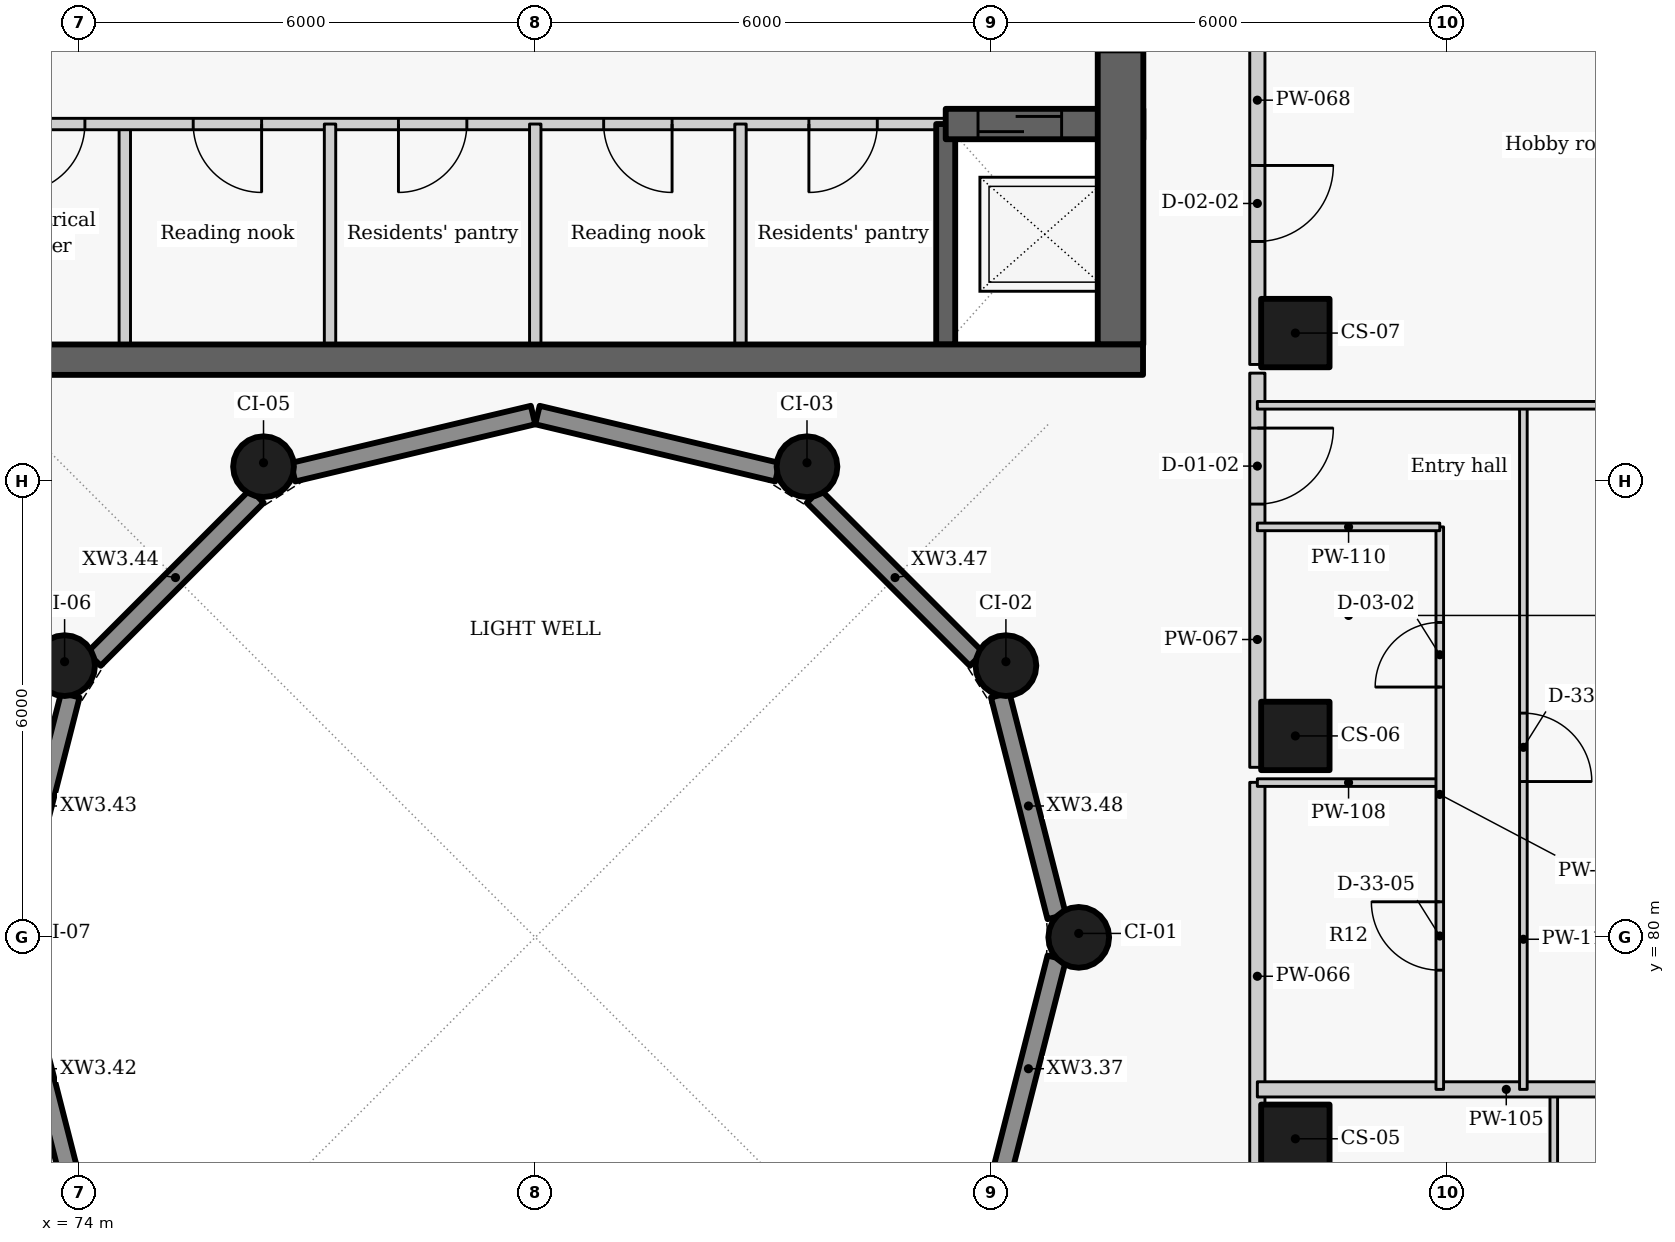
"""IFC4 building model, lengths in metres.
Left out: names, types, materials, properties, quantities, classifications, styles, units other than length and angle.
Written with IfcOpenShell. Run it as: python <this file> out.ifc"""

import sys

from ifc_helpers import new_model, si_unit, direction, frame, frame_2d, origin, origin_2d, place, context, subcontext, project, spatial, rectangle, circle, extrude, element, fill, save


model = new_model("IFC4")
c1 = context("Model", 3, precision=1e-05, world=origin(), true_north=direction((0.0, 1.0)))
c2 = subcontext(c1, "Body", "Model", "MODEL_VIEW")
j1 = project(units=[si_unit("LENGTHUNIT", "METRE"), si_unit("PLANEANGLEUNIT", "RADIAN")], contexts=[c1])
p1 = place(None, origin())
s1 = spatial("IfcSite", under=j1, at=p1, CompositionType="ELEMENT")
p2 = place(p1, origin())
s2 = spatial("IfcBuilding", under=s1, at=p2, CompositionType="ELEMENT")
p3 = place(p2, frame((0.0, 0.0, 239.4)))
s3 = spatial("IfcBuildingStorey", under=s2, at=p3, CompositionType="ELEMENT", Elevation=239.4)
for number, where, z_axis, x_axis in (
    (1, (90.0, 77.35, 0.0), (0.0, 0.0, 1.0), (0.0, 1.0, 0.0)),
    (2, (90.0, 82.65, 0.0), (0.0, 0.0, 1.0), (0.0, 1.0, 0.0)),
    (3, (90.0, 87.95, 0.0), (0.0, 0.0, 1.0), (0.0, 1.0, 0.0)),
):
    element("IfcColumn", number, at=place(p3, frame(where, z_axis=z_axis, x_axis=x_axis)), inside=s3, PredefinedType="COLUMN", context=c2, shape_type="SweptSolid", body=[
        extrude(rectangle(XDim=0.9, YDim=0.9, at=origin_2d()), origin(), (0.0, 0.0, 1.0), 3.3),
    ])
for number, where, z_axis, x_axis in (
    (4, (87.15, 80.0, 0.0), (0.0, 0.0, 1.0), (0.0, 1.0, 0.0)),
    (5, (86.192, 83.575, 0.0), (0.0, 0.0, 1.0), (-0.5, 0.866, 0.0)),
    (6, (83.575, 86.192, 0.0), (0.0, 0.0, 1.0), (-0.866, 0.5, 0.0)),
    (7, (76.425, 86.192, 0.0), (0.0, 0.0, 1.0), (-0.866, -0.5, 0.0)),
    (8, (73.808, 83.575, 0.0), (0.0, 0.0, 1.0), (-0.5, -0.866, 0.0)),
):
    element("IfcColumn", number, at=place(p3, frame(where, z_axis=z_axis, x_axis=x_axis)), inside=s3, PredefinedType="COLUMN", context=c2, shape_type="SweptSolid", body=[
        extrude(circle(Radius=0.4, at=origin_2d()), origin(), (0.0, 0.0, 1.0), 3.3),
    ])
for number, where, z_axis, x_axis in (
    (9, (86.86, 79.73, 0.0), (0.0, 0.0, 1.0), (-0.247, -0.969, 0.0)),
    (10, (73.883, 76.813, 0.0), (0.0, 0.0, 1.0), (-0.247, 0.969, 0.0)),
    (11, (73.14, 80.27, 0.0), (0.0, 0.0, 1.0), (0.247, 0.969, 0.0)),
):
    element("IfcWall", number, at=place(p3, frame(where, z_axis=z_axis, x_axis=x_axis)), inside=s3, PredefinedType="SOLIDWALL", context=c2, shape_type="SweptSolid", body=[
        extrude(rectangle(XDim=3.01, YDim=0.25, at=frame_2d((1.505, 0.0))), origin(), (0.0, 0.0, 1.0), 2.425),
    ])
p4 = place(p3, frame((74.194, 83.661, 0.0), z_axis=(0.0, 0.0, 1.0), x_axis=(0.707106781187, 0.707106781187, 0.0)))
e12 = element("IfcWall", 12, at=p4, inside=s3, PredefinedType="SOLIDWALL", context=c2, shape_type="SweptSolid", body=[
    extrude(rectangle(XDim=3.033, YDim=0.25, at=frame_2d((1.517, 0.0))), origin(), (0.0, 0.0, 1.0), 2.425),
])
for number, where, z_axis, x_axis in (
    (13, (76.814, 86.119, 0.0), (0.0, 0.0, 1.0), (0.973, 0.232, 0.0)),
    (14, (80.029, 86.872, 0.0), (0.0, 0.0, 1.0), (0.973, -0.232, 0.0)),
):
    element("IfcWall", number, at=place(p3, frame(where, z_axis=z_axis, x_axis=x_axis)), inside=s3, PredefinedType="SOLIDWALL", context=c2, shape_type="SweptSolid", body=[
        extrude(rectangle(XDim=3.246, YDim=0.25, at=frame_2d((1.623, 0.0))), origin(), (0.0, 0.0, 1.0), 2.425),
    ])
p5 = place(p3, frame((83.661, 85.806, 0.0), z_axis=(0.0, 0.0, 1.0), x_axis=(0.707106781187, -0.707106781187, 0.0)))
e15 = element("IfcWall", 15, at=p5, inside=s3, PredefinedType="SOLIDWALL", context=c2, shape_type="SweptSolid", body=[
    extrude(rectangle(XDim=3.033, YDim=0.25, at=frame_2d((1.517, 0.0))), origin(), (0.0, 0.0, 1.0), 2.425),
])
p6 = place(p3, frame((86.117, 83.187, 0.0), z_axis=(0.0, 0.0, 1.0), x_axis=(0.247055971283, -0.969001211069, 0.0)))
e16 = element("IfcWall", 16, at=p6, inside=s3, PredefinedType="SOLIDWALL", context=c2, shape_type="SweptSolid", body=[
    extrude(rectangle(XDim=3.01, YDim=0.25, at=frame_2d((1.505, 0.0))), origin(), (0.0, 0.0, 1.0), 2.425),
])
p7 = place(p3, frame((74.6, 87.8, 0.0), z_axis=(0.0, 0.0, 1.0), x_axis=(0.0, 1.0, 0.0)))
e17 = element("IfcWall", 17, at=p7, inside=s3, PredefinedType="PARTITIONING", context=c2, shape_type="SweptSolid", body=[
    extrude(rectangle(XDim=2.9, YDim=0.15, at=frame_2d((1.45, 0.0))), origin(), (0.0, 0.0, 1.0), 3.025),
])
p8 = place(p3, frame((85.4, 90.7, 0.0), z_axis=(0.0, 0.0, 1.0), x_axis=(-1.0, 0.0, 0.0)))
e18 = element("IfcWall", 18, at=p8, inside=s3, PredefinedType="PARTITIONING", context=c2, shape_type="SweptSolid", body=[
    extrude(rectangle(XDim=13.4, YDim=0.15, at=frame_2d((6.7, 0.0))), origin(), (0.0, 0.0, 1.0), 3.025),
])
p9 = place(p8, frame((11.325, 0.0, 0.0)))
e19 = element("IfcOpeningElement", 19, at=p9, cuts=e18, PredefinedType="OPENING", context=c2, shape_type="SweptSolid", body=[
    extrude(rectangle(XDim=0.9, YDim=2.1, at=frame_2d((0.45, 1.05))), frame((0.0, 0.085, 0.0), z_axis=(0.0, -1.0, 0.0), x_axis=(1.0, 0.0, 0.0)), (0.0, 0.0, 1.0), 0.17),
])
p10 = place(p8, frame((9.0, 0.0, 0.0)))
e20 = element("IfcOpeningElement", 20, at=p10, cuts=e18, PredefinedType="OPENING", context=c2, shape_type="SweptSolid", body=[
    extrude(rectangle(XDim=0.9, YDim=2.1, at=frame_2d((0.45, 1.05))), frame((0.0, 0.085, 0.0), z_axis=(0.0, -1.0, 0.0), x_axis=(1.0, 0.0, 0.0)), (0.0, 0.0, 1.0), 0.17),
])
p11 = place(p8, frame((6.3, 0.0, 0.0)))
e21 = element("IfcOpeningElement", 21, at=p11, cuts=e18, PredefinedType="OPENING", context=c2, shape_type="SweptSolid", body=[
    extrude(rectangle(XDim=0.9, YDim=2.1, at=frame_2d((0.45, 1.05))), frame((0.0, 0.085, 0.0), z_axis=(0.0, -1.0, 0.0), x_axis=(1.0, 0.0, 0.0)), (0.0, 0.0, 1.0), 0.17),
])
p12 = place(p8, frame((3.6, 0.0, 0.0)))
e22 = element("IfcOpeningElement", 22, at=p12, cuts=e18, PredefinedType="OPENING", context=c2, shape_type="SweptSolid", body=[
    extrude(rectangle(XDim=0.9, YDim=2.1, at=frame_2d((0.45, 1.05))), frame((0.0, 0.085, 0.0), z_axis=(0.0, -1.0, 0.0), x_axis=(1.0, 0.0, 0.0)), (0.0, 0.0, 1.0), 0.17),
])
p13 = place(p8, frame((0.9, 0.0, 0.0)))
e23 = element("IfcOpeningElement", 23, at=p13, cuts=e18, PredefinedType="OPENING", context=c2, shape_type="SweptSolid", body=[
    extrude(rectangle(XDim=0.9, YDim=2.1, at=frame_2d((0.45, 1.05))), frame((0.0, 0.085, 0.0), z_axis=(0.0, -1.0, 0.0), x_axis=(1.0, 0.0, 0.0)), (0.0, 0.0, 1.0), 0.17),
])
p14 = place(p3, frame((85.4, 87.8, -0.275), z_axis=(0.0, 0.0, 1.0), x_axis=(0.0, 1.0, 0.0)))
e24 = element("IfcWall", 24, at=p14, inside=s3, PredefinedType="SHEAR", context=c2, shape_type="SweptSolid", body=[
    extrude(rectangle(XDim=2.9, YDim=0.25, at=frame_2d((1.45, 0.0))), origin(), (0.0, 0.0, 1.0), 3.3),
])
p15 = place(p3, frame((85.4, 90.7, -0.275), z_axis=(0.0, 0.0, 1.0), x_axis=(1.0, 0.0, 0.0)))
e25 = element("IfcWall", 25, at=p15, inside=s3, PredefinedType="SHEAR", context=c2, shape_type="SweptSolid", body=[
    extrude(rectangle(XDim=2.6, YDim=0.4, at=frame_2d((1.3, 0.0))), origin(), (0.0, 0.0, 1.0), 3.3),
])
p16 = place(p15, frame((0.425, 0.0, 0.275)))
e26 = element("IfcOpeningElement", 26, at=p16, cuts=e25, PredefinedType="OPENING", context=c2, shape_type="SweptSolid", body=[
    extrude(rectangle(XDim=1.1, YDim=2.1, at=frame_2d((0.55, 1.05))), frame((0.0, 0.21, 0.0), z_axis=(0.0, -1.0, 0.0), x_axis=(1.0, 0.0, 0.0)), (0.0, 0.0, 1.0), 0.42),
])
p17 = place(p3, frame((87.7, 102.05, -0.275), z_axis=(0.0, 0.0, 1.0), x_axis=(0.0, -1.0, 0.0)))
e27 = element("IfcWall", 27, at=p17, inside=s3, PredefinedType="SHEAR", context=c2, shape_type="SweptSolid", body=[
    extrude(rectangle(XDim=14.25, YDim=0.6, at=frame_2d((7.125, 0.0))), origin(), (0.0, 0.0, 1.0), 3.3),
])
p18 = place(p17, frame((8.9, 0.0, 0.275)))
e28 = element("IfcOpeningElement", 28, at=p18, cuts=e27, PredefinedType="OPENING", context=c2, shape_type="SweptSolid", body=[
    extrude(rectangle(XDim=1.5, YDim=2.1, at=frame_2d((0.75, 1.05))), frame((0.0, 0.31, 0.0), z_axis=(0.0, -1.0, 0.0), x_axis=(1.0, 0.0, 0.0)), (0.0, 0.0, 1.0), 0.62),
])
p19 = place(p17, frame((2.025, 0.0, 0.275)))
e29 = element("IfcOpeningElement", 29, at=p19, cuts=e27, PredefinedType="OPENING", context=c2, shape_type="SweptSolid", body=[
    extrude(rectangle(XDim=1.1, YDim=2.1, at=frame_2d((0.55, 1.05))), frame((0.0, 0.31, 0.0), z_axis=(0.0, -1.0, 0.0), x_axis=(1.0, 0.0, 0.0)), (0.0, 0.0, 1.0), 0.62),
])
for number, where, z_axis, x_axis in (
    (30, (77.3, 87.8, 0.0), (0.0, 0.0, 1.0), (0.0, 1.0, 0.0)),
    (31, (80.0, 87.8, 0.0), (0.0, 0.0, 1.0), (0.0, 1.0, 0.0)),
    (32, (82.7, 87.8, 0.0), (0.0, 0.0, 1.0), (0.0, 1.0, 0.0)),
):
    element("IfcWall", number, at=place(p3, frame(where, z_axis=z_axis, x_axis=x_axis)), inside=s3, PredefinedType="PARTITIONING", context=c2, shape_type="SweptSolid", body=[
        extrude(rectangle(XDim=2.9, YDim=0.15, at=frame_2d((1.45, 0.0))), origin(), (0.0, 0.0, 1.0), 3.025),
    ])
p20 = place(p3, frame((89.5, 76.937, 0.0), z_axis=(0.0, 0.0, 1.0), x_axis=(0.0, 1.0, 0.0)))
e33 = element("IfcWall", 33, at=p20, inside=s3, PredefinedType="PARTITIONING", context=c2, shape_type="SweptSolid", body=[
    extrude(rectangle(XDim=5.102, YDim=0.2, at=frame_2d((2.551, 0.0))), origin(), (0.0, 0.0, 1.0), 3.025),
])
p21 = place(p3, frame((89.5, 87.423, 0.0), z_axis=(0.0, 0.0, 1.0), x_axis=(0.0, -1.0, 0.0)))
e34 = element("IfcWall", 34, at=p21, inside=s3, PredefinedType="PARTITIONING", context=c2, shape_type="SweptSolid", body=[
    extrude(rectangle(XDim=5.186, YDim=0.2, at=frame_2d((2.593, 0.0))), origin(), (0.0, 0.0, 1.0), 3.025),
])
p22 = place(p21, frame((0.723, 0.0, 0.0)))
e35 = element("IfcOpeningElement", 35, at=p22, cuts=e34, PredefinedType="OPENING", context=c2, shape_type="SweptSolid", body=[
    extrude(rectangle(XDim=1.0, YDim=2.1, at=frame_2d((0.5, 1.05))), frame((0.0, 0.11, 0.0), z_axis=(0.0, -1.0, 0.0), x_axis=(1.0, 0.0, 0.0)), (0.0, 0.0, 1.0), 0.22),
])
p23 = place(p3, frame((89.5, 91.773, 0.0), z_axis=(0.0, 0.0, 1.0), x_axis=(0.0, -1.0, 0.0)))
e36 = element("IfcWall", 36, at=p23, inside=s3, PredefinedType="PARTITIONING", context=c2, shape_type="SweptSolid", body=[
    extrude(rectangle(XDim=4.236, YDim=0.2, at=frame_2d((2.118, 0.0))), origin(), (0.0, 0.0, 1.0), 3.025),
])
p24 = place(p23, frame((1.618, 0.0, 0.0)))
e37 = element("IfcOpeningElement", 37, at=p24, cuts=e36, PredefinedType="OPENING", context=c2, shape_type="SweptSolid", body=[
    extrude(rectangle(XDim=1.0, YDim=2.1, at=frame_2d((0.5, 1.05))), frame((0.0, 0.11, 0.0), z_axis=(0.0, -1.0, 0.0), x_axis=(1.0, 0.0, 0.0)), (0.0, 0.0, 1.0), 0.22),
])
p25 = place(p3, frame((93.4, 78.0, 0.0), z_axis=(0.0, 0.0, 1.0), x_axis=(0.0, -1.0, 0.0)))
e38 = element("IfcWall", 38, at=p25, inside=s3, PredefinedType="PARTITIONING", context=c2, shape_type="SweptSolid", body=[
    extrude(rectangle(XDim=11.2, YDim=0.1, at=frame_2d((5.6, 0.0))), origin(), (0.0, 0.0, 1.0), 3.025),
])
p26 = place(p25, frame((9.124, 0.0, 0.0)))
e39 = element("IfcOpeningElement", 39, at=p26, cuts=e38, PredefinedType="OPENING", context=c2, shape_type="SweptSolid", body=[
    extrude(rectangle(XDim=0.9, YDim=2.1, at=frame_2d((0.45, 1.05))), frame((0.0, 0.06, 0.0), z_axis=(0.0, -1.0, 0.0), x_axis=(1.0, 0.0, 0.0)), (0.0, 0.0, 1.0), 0.12),
])
p27 = place(p25, frame((5.873, 0.0, 0.0)))
e40 = element("IfcOpeningElement", 40, at=p27, cuts=e38, PredefinedType="OPENING", context=c2, shape_type="SweptSolid", body=[
    extrude(rectangle(XDim=0.9, YDim=2.1, at=frame_2d((0.45, 1.05))), frame((0.0, 0.06, 0.0), z_axis=(0.0, -1.0, 0.0), x_axis=(1.0, 0.0, 0.0)), (0.0, 0.0, 1.0), 0.12),
])
p28 = place(p25, frame((1.898, 0.0, 0.0)))
e41 = element("IfcOpeningElement", 41, at=p28, cuts=e38, PredefinedType="OPENING", context=c2, shape_type="SweptSolid", body=[
    extrude(rectangle(XDim=0.9, YDim=2.1, at=frame_2d((0.45, 1.05))), frame((0.0, 0.06, 0.0), z_axis=(0.0, -1.0, 0.0), x_axis=(1.0, 0.0, 0.0)), (0.0, 0.0, 1.0), 0.12),
])
p29 = place(p3, frame((89.5, 78.0, 0.0), z_axis=(0.0, 0.0, 1.0), x_axis=(1.0, 0.0, 0.0)))
e42 = element("IfcWall", 42, at=p29, inside=s3, PredefinedType="PARTITIONING", context=c2, shape_type="SweptSolid", body=[
    extrude(rectangle(XDim=6.55, YDim=0.2, at=frame_2d((3.275, 0.0))), origin(), (0.0, 0.0, 1.0), 2.405),
])
p30 = place(p3, frame((89.5, 82.036, 0.0), z_axis=(0.0, 0.0, 1.0), x_axis=(1.0, 0.0, 0.0)))
e43 = element("IfcWall", 43, at=p30, inside=s3, PredefinedType="PARTITIONING", context=c2, shape_type="SweptSolid", body=[
    extrude(rectangle(XDim=2.4, YDim=0.1, at=frame_2d((1.2, 0.0))), origin(), (0.0, 0.0, 1.0), 2.505),
])
p31 = place(p3, frame((91.9, 78.0, 0.0), z_axis=(0.0, 0.0, 1.0), x_axis=(0.0, 1.0, 0.0)))
e44 = element("IfcWall", 44, at=p31, inside=s3, PredefinedType="PARTITIONING", context=c2, shape_type="SweptSolid", body=[
    extrude(rectangle(XDim=7.4, YDim=0.1, at=frame_2d((3.7, 0.0))), origin(), (0.0, 0.0, 1.0), 3.025),
])
p32 = place(p31, frame((1.568, 0.0, 0.0)))
e45 = element("IfcOpeningElement", 45, at=p32, cuts=e44, PredefinedType="OPENING", context=c2, shape_type="SweptSolid", body=[
    extrude(rectangle(XDim=0.9, YDim=2.1, at=frame_2d((0.45, 1.05))), frame((0.0, 0.06, 0.0), z_axis=(0.0, -1.0, 0.0), x_axis=(1.0, 0.0, 0.0)), (0.0, 0.0, 1.0), 0.12),
])
p33 = place(p31, frame((5.293, 0.0, 0.0)))
e46 = element("IfcOpeningElement", 46, at=p33, cuts=e44, PredefinedType="OPENING", context=c2, shape_type="SweptSolid", body=[
    extrude(rectangle(XDim=0.85, YDim=2.1, at=frame_2d((0.425, 1.05))), frame((0.0, 0.06, 0.0), z_axis=(0.0, -1.0, 0.0), x_axis=(1.0, 0.0, 0.0)), (0.0, 0.0, 1.0), 0.12),
])
p34 = place(p3, frame((89.5, 85.4, 0.0), z_axis=(0.0, 0.0, 1.0), x_axis=(1.0, 0.0, 0.0)))
e47 = element("IfcWall", 47, at=p34, inside=s3, PredefinedType="PARTITIONING", context=c2, shape_type="SweptSolid", body=[
    extrude(rectangle(XDim=2.4, YDim=0.1, at=frame_2d((1.2, 0.0))), origin(), (0.0, 0.0, 1.0), 2.505),
])
p35 = place(p3, frame((93.0, 87.0, 0.0), z_axis=(0.0, 0.0, 1.0), x_axis=(0.0, -1.0, 0.0)))
e48 = element("IfcWall", 48, at=p35, inside=s3, PredefinedType="PARTITIONING", context=c2, shape_type="SweptSolid", body=[
    extrude(rectangle(XDim=9.0, YDim=0.1, at=frame_2d((4.5, 0.0))), origin(), (0.0, 0.0, 1.0), 3.025),
])
p36 = place(p35, frame((4.05, 0.0, 0.0)))
e49 = element("IfcOpeningElement", 49, at=p36, cuts=e48, PredefinedType="OPENING", context=c2, shape_type="SweptSolid", body=[
    extrude(rectangle(XDim=0.9, YDim=2.1, at=frame_2d((0.45, 1.05))), frame((0.0, 0.06, 0.0), z_axis=(0.0, -1.0, 0.0), x_axis=(1.0, 0.0, 0.0)), (0.0, 0.0, 1.0), 0.12),
])
p37 = place(p3, frame((89.5, 87.0, 0.0), z_axis=(0.0, 0.0, 1.0), x_axis=(1.0, 0.0, 0.0)))
e50 = element("IfcWall", 50, at=p37, inside=s3, PredefinedType="PARTITIONING", context=c2, shape_type="SweptSolid", body=[
    extrude(rectangle(XDim=11.55, YDim=0.1, at=frame_2d((5.775, 0.0))), origin(), (0.0, 0.0, 1.0), 2.505),
])
p38 = place(p3, frame((72.004, 87.6, -0.275), z_axis=(0.0, 0.0, 1.0), x_axis=(1.0, 0.0, 0.0)))
e51 = element("IfcWall", 51, at=p38, inside=s3, PredefinedType="SHEAR", context=c2, shape_type="SweptSolid", body=[
    extrude(rectangle(XDim=15.992, YDim=0.4, at=frame_2d((7.996, 0.0))), origin(), (0.0, 0.0, 1.0), 3.3),
])
p39 = place(p9, origin())
e52 = element("IfcDoor", 52, at=p39, inside=s3, OperationType="SINGLE_SWING_RIGHT", PredefinedType="DOOR", context=c2, shape_type="SweptSolid", body=[
    extrude(rectangle(XDim=0.9, YDim=2.1, at=frame_2d((0.45, 1.05))), frame((0.0, 0.025, 0.0), z_axis=(0.0, -1.0, 0.0), x_axis=(1.0, 0.0, 0.0)), (0.0, 0.0, 1.0), 0.05),
])
fill(e19, e52)
p40 = place(p16, origin())
e53 = element("IfcDoor", 53, at=p40, inside=s3, OperationType="SLIDING_TO_LEFT", PredefinedType="DOOR", context=c2, shape_type="SweptSolid", body=[
    extrude(rectangle(XDim=1.1, YDim=2.1, at=frame_2d((0.55, 1.05))), frame((0.0, 0.025, 0.0), z_axis=(0.0, -1.0, 0.0), x_axis=(1.0, 0.0, 0.0)), (0.0, 0.0, 1.0), 0.05),
])
fill(e26, e53)
p41 = place(p10, origin())
e54 = element("IfcDoor", 54, at=p41, inside=s3, OperationType="SINGLE_SWING_LEFT", PredefinedType="DOOR", context=c2, shape_type="SweptSolid", body=[
    extrude(rectangle(XDim=0.9, YDim=2.1, at=frame_2d((0.45, 1.05))), frame((0.0, 0.025, 0.0), z_axis=(0.0, -1.0, 0.0), x_axis=(1.0, 0.0, 0.0)), (0.0, 0.0, 1.0), 0.05),
])
fill(e20, e54)
p42 = place(p11, origin())
e55 = element("IfcDoor", 55, at=p42, inside=s3, OperationType="SINGLE_SWING_RIGHT", PredefinedType="DOOR", context=c2, shape_type="SweptSolid", body=[
    extrude(rectangle(XDim=0.9, YDim=2.1, at=frame_2d((0.45, 1.05))), frame((0.0, 0.025, 0.0), z_axis=(0.0, -1.0, 0.0), x_axis=(1.0, 0.0, 0.0)), (0.0, 0.0, 1.0), 0.05),
])
fill(e21, e55)
p43 = place(p12, origin())
e56 = element("IfcDoor", 56, at=p43, inside=s3, OperationType="SINGLE_SWING_LEFT", PredefinedType="DOOR", context=c2, shape_type="SweptSolid", body=[
    extrude(rectangle(XDim=0.9, YDim=2.1, at=frame_2d((0.45, 1.05))), frame((0.0, 0.025, 0.0), z_axis=(0.0, -1.0, 0.0), x_axis=(1.0, 0.0, 0.0)), (0.0, 0.0, 1.0), 0.05),
])
fill(e22, e56)
p44 = place(p13, origin())
e57 = element("IfcDoor", 57, at=p44, inside=s3, OperationType="SINGLE_SWING_RIGHT", PredefinedType="DOOR", context=c2, shape_type="SweptSolid", body=[
    extrude(rectangle(XDim=0.9, YDim=2.1, at=frame_2d((0.45, 1.05))), frame((0.0, 0.025, 0.0), z_axis=(0.0, -1.0, 0.0), x_axis=(1.0, 0.0, 0.0)), (0.0, 0.0, 1.0), 0.05),
])
fill(e23, e57)
p45 = place(p22, origin())
e58 = element("IfcDoor", 58, at=p45, inside=s3, OperationType="SINGLE_SWING_LEFT", PredefinedType="DOOR", context=c2, shape_type="SweptSolid", body=[
    extrude(rectangle(XDim=1.0, YDim=2.1, at=frame_2d((0.5, 1.05))), frame((0.0, 0.025, 0.0), z_axis=(0.0, -1.0, 0.0), x_axis=(1.0, 0.0, 0.0)), (0.0, 0.0, 1.0), 0.05),
])
fill(e35, e58)
p46 = place(p32, origin())
e59 = element("IfcDoor", 59, at=p46, inside=s3, OperationType="SINGLE_SWING_RIGHT", PredefinedType="DOOR", context=c2, shape_type="SweptSolid", body=[
    extrude(rectangle(XDim=0.9, YDim=2.1, at=frame_2d((0.45, 1.05))), frame((0.0, 0.025, 0.0), z_axis=(0.0, -1.0, 0.0), x_axis=(1.0, 0.0, 0.0)), (0.0, 0.0, 1.0), 0.05),
])
fill(e45, e59)
p47 = place(p33, origin())
e60 = element("IfcDoor", 60, at=p47, inside=s3, OperationType="SINGLE_SWING_LEFT", PredefinedType="DOOR", context=c2, shape_type="SweptSolid", body=[
    extrude(rectangle(XDim=0.85, YDim=2.1, at=frame_2d((0.425, 1.05))), frame((0.0, 0.025, 0.0), z_axis=(0.0, -1.0, 0.0), x_axis=(1.0, 0.0, 0.0)), (0.0, 0.0, 1.0), 0.05),
])
fill(e46, e60)
p48 = place(p36, origin())
e61 = element("IfcDoor", 61, at=p48, inside=s3, OperationType="SINGLE_SWING_RIGHT", PredefinedType="DOOR", context=c2, shape_type="SweptSolid", body=[
    extrude(rectangle(XDim=0.9, YDim=2.1, at=frame_2d((0.45, 1.05))), frame((0.0, 0.025, 0.0), z_axis=(0.0, -1.0, 0.0), x_axis=(1.0, 0.0, 0.0)), (0.0, 0.0, 1.0), 0.05),
])
fill(e49, e61)
p49 = place(p24, origin())
e62 = element("IfcDoor", 62, at=p49, inside=s3, OperationType="SINGLE_SWING_LEFT", PredefinedType="DOOR", context=c2, shape_type="SweptSolid", body=[
    extrude(rectangle(XDim=1.0, YDim=2.1, at=frame_2d((0.5, 1.05))), frame((0.0, 0.025, 0.0), z_axis=(0.0, -1.0, 0.0), x_axis=(1.0, 0.0, 0.0)), (0.0, 0.0, 1.0), 0.05),
])
fill(e37, e62)
save(model, sys.argv[1])
